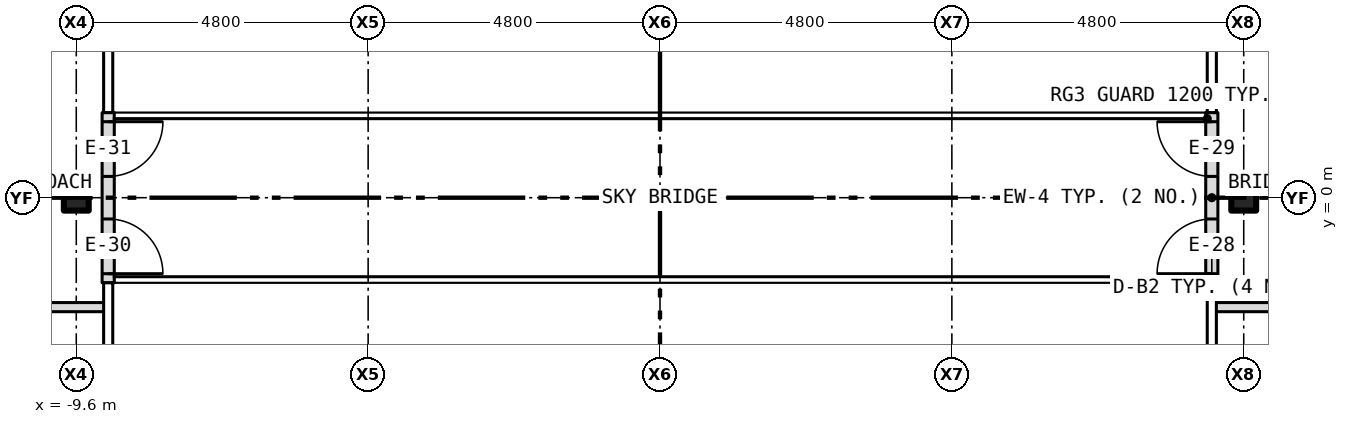
"""IFC4 building model, lengths in metres.
Left out: names, types, materials, properties, quantities, classifications, styles, units other than length and angle.
Written with IfcOpenShell. Run it as: python <this file> out.ifc"""

import sys

from ifc_helpers import new_model, si_unit, direction, frame, frame_2d, origin, origin_2d, place, context, subcontext, project, spatial, rectangle, i_section, extrude, element, fill, save


model = new_model("IFC4")
c1 = context("Model", 3, precision=1e-05, world=origin(), true_north=direction((0.0, 1.0)))
c2 = subcontext(c1, "Body", "Model", "MODEL_VIEW")
j1 = project(units=[si_unit("LENGTHUNIT", "METRE"), si_unit("PLANEANGLEUNIT", "RADIAN")], contexts=[c1])
p1 = place(None, origin())
s1 = spatial("IfcSite", under=j1, at=p1, CompositionType="ELEMENT")
p2 = place(p1, origin())
s2 = spatial("IfcBuilding", under=s1, at=p2, CompositionType="ELEMENT")
p3 = place(p2, frame((0.0, 0.0, 70.5)))
s3 = spatial("IfcBuildingStorey", under=s2, at=p3, CompositionType="ELEMENT", Elevation=70.5)
for number, where, z_axis, x_axis in (
    (1, (-9.6, 0.0, -0.15), (0.0, 0.0, 1.0), (1.0, 0.0, 0.0)),
    (2, (9.6, 0.0, -0.15), (0.0, 0.0, 1.0), (1.0, 0.0, 0.0)),
):
    element("IfcColumn", number, at=place(p3, frame(where, z_axis=z_axis, x_axis=x_axis)), inside=s3, PredefinedType="COLUMN", context=c2, shape_type="SweptSolid", body=[
        extrude(i_section(OverallWidth=0.409, OverallDepth=0.424, WebThickness=0.033, FlangeThickness=0.052, at=origin_2d()), origin(), (0.0, 0.0, 1.0), 3.5),
    ])
p4 = place(p3, frame((9.075, -1.4, 0.0), z_axis=(0.0, 0.0, 1.0), x_axis=(0.0, 1.0, 0.0)))
e3 = element("IfcWall", 3, at=p4, inside=s3, PredefinedType="SOLIDWALL", context=c2, shape_type="SweptSolid", body=[
    extrude(rectangle(XDim=2.8, YDim=0.2, at=frame_2d((1.4, 0.0))), origin(), (0.0, 0.0, 1.0), 3.5),
])
p5 = place(p4, frame((0.15, 0.0, 0.0)))
e4 = element("IfcOpeningElement", 4, at=p5, cuts=e3, PredefinedType="OPENING", context=c2, shape_type="SweptSolid", body=[
    extrude(rectangle(XDim=0.9, YDim=2.1, at=frame_2d((0.45, 1.05))), frame((0.0, 0.112, 0.0), z_axis=(0.0, -1.0, 0.0), x_axis=(1.0, 0.0, 0.0)), (0.0, 0.0, 1.0), 0.224),
])
p6 = place(p4, frame((1.75, 0.0, 0.0)))
e5 = element("IfcOpeningElement", 5, at=p6, cuts=e3, PredefinedType="OPENING", context=c2, shape_type="SweptSolid", body=[
    extrude(rectangle(XDim=0.9, YDim=2.1, at=frame_2d((0.45, 1.05))), frame((0.0, 0.112, 0.0), z_axis=(0.0, -1.0, 0.0), x_axis=(1.0, 0.0, 0.0)), (0.0, 0.0, 1.0), 0.224),
])
p7 = place(p3, frame((-9.075, -1.4, 0.0), z_axis=(0.0, 0.0, 1.0), x_axis=(0.0, 1.0, 0.0)))
e6 = element("IfcWall", 6, at=p7, inside=s3, PredefinedType="SOLIDWALL", context=c2, shape_type="SweptSolid", body=[
    extrude(rectangle(XDim=2.8, YDim=0.2, at=frame_2d((1.4, 0.0))), origin(), (0.0, 0.0, 1.0), 3.5),
])
p8 = place(p7, frame((0.15, 0.0, 0.0)))
e7 = element("IfcOpeningElement", 7, at=p8, cuts=e6, PredefinedType="OPENING", context=c2, shape_type="SweptSolid", body=[
    extrude(rectangle(XDim=0.9, YDim=2.1, at=frame_2d((0.45, 1.05))), frame((0.0, 0.112, 0.0), z_axis=(0.0, -1.0, 0.0), x_axis=(1.0, 0.0, 0.0)), (0.0, 0.0, 1.0), 0.224),
])
p9 = place(p7, frame((1.75, 0.0, 0.0)))
e8 = element("IfcOpeningElement", 8, at=p9, cuts=e6, PredefinedType="OPENING", context=c2, shape_type="SweptSolid", body=[
    extrude(rectangle(XDim=0.9, YDim=2.1, at=frame_2d((0.45, 1.05))), frame((0.0, 0.112, 0.0), z_axis=(0.0, -1.0, 0.0), x_axis=(1.0, 0.0, 0.0)), (0.0, 0.0, 1.0), 0.224),
])
for number, where, z_axis, x_axis in (
    (9, (-12.4, -1.8, 0.0), (0.0, 0.0, 1.0), (1.0, 0.0, 0.0)),
    (10, (9.12, -1.8, 0.0), (0.0, 0.0, 1.0), (1.0, 0.0, 0.0)),
):
    element("IfcWall", number, at=place(p3, frame(where, z_axis=z_axis, x_axis=x_axis)), inside=s3, PredefinedType="PARTITIONING", context=c2, shape_type="SweptSolid", body=[
        extrude(rectangle(XDim=3.28, YDim=0.15, at=frame_2d((1.64, 0.0))), origin(), (0.0, 0.0, 1.0), 3.35),
    ])
p10 = place(p5, origin())
e11 = element("IfcDoor", 11, at=p10, inside=s3, OperationType="SINGLE_SWING_LEFT", PredefinedType="DOOR", context=c2, shape_type="SweptSolid", body=[
    extrude(rectangle(XDim=0.9, YDim=2.1, at=frame_2d((0.45, 1.05))), frame((0.0, 0.025, 0.0), z_axis=(0.0, -1.0, 0.0), x_axis=(1.0, 0.0, 0.0)), (0.0, 0.0, 1.0), 0.05),
])
fill(e4, e11)
p11 = place(p6, origin())
e12 = element("IfcDoor", 12, at=p11, inside=s3, OperationType="SINGLE_SWING_RIGHT", PredefinedType="DOOR", context=c2, shape_type="SweptSolid", body=[
    extrude(rectangle(XDim=0.9, YDim=2.1, at=frame_2d((0.45, 1.05))), frame((0.0, 0.025, 0.0), z_axis=(0.0, -1.0, 0.0), x_axis=(1.0, 0.0, 0.0)), (0.0, 0.0, 1.0), 0.05),
])
fill(e5, e12)
p12 = place(p8, origin())
e13 = element("IfcDoor", 13, at=p12, inside=s3, OperationType="SINGLE_SWING_LEFT", PredefinedType="DOOR", context=c2, shape_type="SweptSolid", body=[
    extrude(rectangle(XDim=0.9, YDim=2.1, at=frame_2d((0.45, 1.05))), frame((0.0, 0.025, 0.0), z_axis=(0.0, -1.0, 0.0), x_axis=(1.0, 0.0, 0.0)), (0.0, 0.0, 1.0), 0.05),
])
fill(e7, e13)
p13 = place(p9, origin())
e14 = element("IfcDoor", 14, at=p13, inside=s3, OperationType="SINGLE_SWING_RIGHT", PredefinedType="DOOR", context=c2, shape_type="SweptSolid", body=[
    extrude(rectangle(XDim=0.9, YDim=2.1, at=frame_2d((0.45, 1.05))), frame((0.0, 0.025, 0.0), z_axis=(0.0, -1.0, 0.0), x_axis=(1.0, 0.0, 0.0)), (0.0, 0.0, 1.0), 0.05),
])
fill(e8, e14)
save(model, sys.argv[1])
